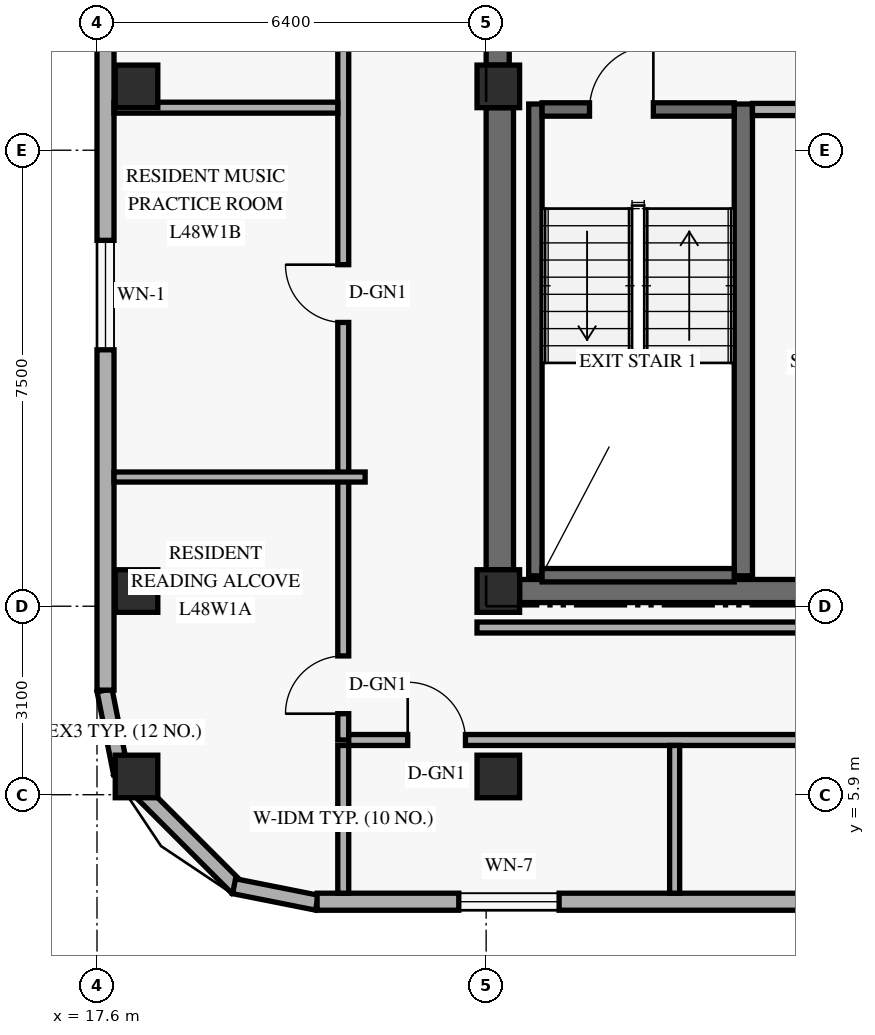
"""IFC4 building model, lengths in metres.
Left out: names, types, materials, properties, quantities, classifications, styles, units other than length and angle.
Written with IfcOpenShell. Run it as: python <this file> out.ifc"""

import sys

from ifc_helpers import new_model, si_unit, direction, frame, frame_2d, origin, origin_2d, place, context, subcontext, project, spatial, rectangle, extrude, element, fill, save


model = new_model("IFC4")
c1 = context("Model", 3, precision=1e-05, world=origin(), true_north=direction((0.0, 1.0)))
c2 = subcontext(c1, "Body", "Model", "MODEL_VIEW")
j1 = project(units=[si_unit("LENGTHUNIT", "METRE"), si_unit("PLANEANGLEUNIT", "RADIAN")], contexts=[c1])
p1 = place(None, origin())
s1 = spatial("IfcSite", under=j1, at=p1, CompositionType="ELEMENT")
p2 = place(p1, origin())
s2 = spatial("IfcBuilding", under=s1, at=p2, CompositionType="ELEMENT")
p3 = place(p2, frame((0.0, 0.0, 184.8)))
s3 = spatial("IfcBuildingStorey", under=s2, at=p3, CompositionType="ELEMENT", Elevation=184.8)
p4 = place(p3, frame((24.225, 9.6, 0.0), z_axis=(0.0, 0.0, 1.0), x_axis=(0.0, 1.0, 0.0)))
e1 = element("IfcWall", 1, at=p4, inside=s3, PredefinedType="SHEAR", context=c2, shape_type="SweptSolid", body=[
    extrude(rectangle(XDim=7.6, YDim=0.45, at=frame_2d((3.8, 0.0))), origin(), (0.0, 0.0, 1.0), 2.748),
])
p5 = place(p3, frame((24.19, 17.9, 0.0), z_axis=(0.0, 0.0, 1.0), x_axis=(0.0, 1.0, 0.0)))
e2 = element("IfcWall", 2, at=p5, inside=s3, PredefinedType="SHEAR", context=c2, shape_type="SweptSolid", body=[
    extrude(rectangle(XDim=11.95, YDim=0.38, at=frame_2d((5.975, 0.0))), origin(), (0.0, 0.0, 1.0), 2.748),
])
p6 = place(p3, frame((24.55, 9.25, 0.0), z_axis=(0.0, 0.0, 1.0), x_axis=(1.0, 0.0, 0.0)))
e3 = element("IfcWall", 3, at=p6, inside=s3, PredefinedType="SHEAR", context=c2, shape_type="SweptSolid", body=[
    extrude(rectangle(XDim=10.3, YDim=0.38, at=frame_2d((5.15, 0.0))), origin(), (0.0, 0.0, 1.0), 3.36),
])
p7 = place(p6, frame((5.2, 0.0, 0.0)))
e4 = element("IfcOpeningElement", 4, at=p7, cuts=e3, PredefinedType="OPENING", context=c2, shape_type="SweptSolid", body=[
    extrude(rectangle(XDim=1.05, YDim=2.15, at=frame_2d((0.525, 1.075))), frame((0.0, 0.2, 0.0), z_axis=(0.0, -1.0, 0.0), x_axis=(1.0, 0.0, 0.0)), (0.0, 0.0, 1.0), 0.4),
])
p8 = place(p3, frame((24.81, 9.5, 0.0), z_axis=(0.0, 0.0, 1.0), x_axis=(0.0, 1.0, 0.0)))
e5 = element("IfcWall", 5, at=p8, inside=s3, PredefinedType="SHEAR", context=c2, shape_type="SweptSolid", body=[
    extrude(rectangle(XDim=7.76, YDim=0.22, at=frame_2d((3.88, 0.0))), origin(), (0.0, 0.0, 1.0), 3.36),
])
p9 = place(p3, frame((28.23, 9.5, 0.0), z_axis=(0.0, 0.0, 1.0), x_axis=(0.0, 1.0, 0.0)))
e6 = element("IfcWall", 6, at=p9, inside=s3, PredefinedType="SHEAR", context=c2, shape_type="SweptSolid", body=[
    extrude(rectangle(XDim=7.76, YDim=0.3, at=frame_2d((3.88, 0.0))), origin(), (0.0, 0.0, 1.0), 3.36),
])
p10 = place(p3, frame((24.92, 9.51, 0.0), z_axis=(0.0, 0.0, 1.0), x_axis=(1.0, 0.0, 0.0)))
e7 = element("IfcWall", 7, at=p10, inside=s3, PredefinedType="SHEAR", context=c2, shape_type="SweptSolid", body=[
    extrude(rectangle(XDim=3.16, YDim=0.22, at=frame_2d((1.58, 0.0))), origin(), (0.0, 0.0, 1.0), 3.36),
])
p11 = place(p3, frame((24.92, 17.17, 0.0), z_axis=(0.0, 0.0, 1.0), x_axis=(1.0, 0.0, 0.0)))
e8 = element("IfcWall", 8, at=p11, inside=s3, PredefinedType="SHEAR", context=c2, shape_type="SweptSolid", body=[
    extrude(rectangle(XDim=3.16, YDim=0.22, at=frame_2d((1.58, 0.0))), origin(), (0.0, 0.0, 1.0), 3.36),
])
p12 = place(p11, frame((0.78, 0.0, 0.0)))
e9 = element("IfcOpeningElement", 9, at=p12, cuts=e8, PredefinedType="OPENING", context=c2, shape_type="SweptSolid", body=[
    extrude(rectangle(XDim=1.05, YDim=2.15, at=frame_2d((0.525, 1.075))), frame((0.0, 0.12, 0.0), z_axis=(0.0, -1.0, 0.0), x_axis=(1.0, 0.0, 0.0)), (0.0, 0.0, 1.0), 0.24),
])
for number, where, z_axis, x_axis in (
    (10, (18.25, 6.2, 0.0), (0.0, 0.0, 1.0), (1.0, 0.0, 0.0)),
    (11, (18.25, 9.25, 0.0), (0.0, 0.0, 1.0), (1.0, 0.0, 0.0)),
    (12, (18.25, 17.55, 0.0), (0.0, 0.0, 1.0), (1.0, 0.0, 0.0)),
    (13, (24.2, 6.2, 0.0), (0.0, 0.0, 1.0), (1.0, 0.0, 0.0)),
    (14, (24.2, 9.25, 0.0), (0.0, 0.0, 1.0), (1.0, 0.0, 0.0)),
    (15, (24.2, 17.55, 0.0), (0.0, 0.0, 1.0), (1.0, 0.0, 0.0)),
):
    element("IfcColumn", number, at=place(p3, frame(where, z_axis=z_axis, x_axis=x_axis)), inside=s3, PredefinedType="COLUMN", context=c2, shape_type="SweptSolid", body=[
        extrude(rectangle(XDim=0.7, YDim=0.7, at=origin_2d()), origin(), (0.0, 0.0, 1.0), 3.6),
    ])
p13 = place(p3, frame((17.724, 7.616, 0.0), z_axis=(0.0, 0.0, 1.0), x_axis=(0.195135625965, -0.9807762678, 0.0)))
e16 = element("IfcWall", 16, at=p13, inside=s3, PredefinedType="SOLIDWALL", context=c2, shape_type="SweptSolid", body=[
    extrude(rectangle(XDim=1.389, YDim=0.25, at=frame_2d((0.694, 0.0))), origin(), (0.0, 0.0, 1.0), 3.36),
])
p14 = place(p3, frame((17.968, 6.305, 0.0), z_axis=(0.0, 0.0, 1.0), x_axis=(0.707106781187, -0.707106781187, 0.0)))
e17 = element("IfcWall", 17, at=p14, inside=s3, PredefinedType="SOLIDWALL", context=c2, shape_type="SweptSolid", body=[
    extrude(rectangle(XDim=2.739, YDim=0.25, at=frame_2d((1.37, 0.0))), origin(), (0.0, 0.0, 1.0), 3.36),
])
p15 = place(p3, frame((19.854, 4.395, 0.0), z_axis=(0.0, 0.0, 1.0), x_axis=(0.980809899341, -0.19496651342, 0.0)))
e18 = element("IfcWall", 18, at=p15, inside=s3, PredefinedType="SOLIDWALL", context=c2, shape_type="SweptSolid", body=[
    extrude(rectangle(XDim=1.389, YDim=0.25, at=frame_2d((0.694, 0.0))), origin(), (0.0, 0.0, 1.0), 3.36),
])
p16 = place(p3, frame((21.22, 4.14, 0.0), z_axis=(0.0, 0.0, 1.0), x_axis=(1.0, 0.0, 0.0)))
e19 = element("IfcWall", 19, at=p16, inside=s3, PredefinedType="SOLIDWALL", context=c2, shape_type="SweptSolid", body=[
    extrude(rectangle(XDim=33.76, YDim=0.28, at=frame_2d((16.88, 0.0))), origin(), (0.0, 0.0, 1.0), 3.36),
])
p17 = place(p16, frame((2.33, 0.0, 0.85)))
e20 = element("IfcOpeningElement", 20, at=p17, cuts=e19, PredefinedType="OPENING", context=c2, shape_type="SweptSolid", body=[
    extrude(rectangle(XDim=1.65, YDim=1.6, at=frame_2d((0.825, 0.8))), frame((0.0, 0.15, 0.0), z_axis=(0.0, -1.0, 0.0), x_axis=(1.0, 0.0, 0.0)), (0.0, 0.0, 1.0), 0.3),
])
p18 = place(p16, frame((9.215, 0.0, 0.85)))
e21 = element("IfcOpeningElement", 21, at=p18, cuts=e19, PredefinedType="OPENING", context=c2, shape_type="SweptSolid", body=[
    extrude(rectangle(XDim=1.65, YDim=1.6, at=frame_2d((0.825, 0.8))), frame((0.0, 0.15, 0.0), z_axis=(0.0, -1.0, 0.0), x_axis=(1.0, 0.0, 0.0)), (0.0, 0.0, 1.0), 0.3),
])
p19 = place(p16, frame((14.64, 0.0, 0.85)))
e22 = element("IfcOpeningElement", 22, at=p19, cuts=e19, PredefinedType="OPENING", context=c2, shape_type="SweptSolid", body=[
    extrude(rectangle(XDim=1.65, YDim=1.6, at=frame_2d((0.825, 0.8))), frame((0.0, 0.15, 0.0), z_axis=(0.0, -1.0, 0.0), x_axis=(1.0, 0.0, 0.0)), (0.0, 0.0, 1.0), 0.3),
])
p20 = place(p16, frame((20.489, 0.0, 0.85)))
e23 = element("IfcOpeningElement", 23, at=p20, cuts=e19, PredefinedType="OPENING", context=c2, shape_type="SweptSolid", body=[
    extrude(rectangle(XDim=1.65, YDim=1.6, at=frame_2d((0.825, 0.8))), frame((0.0, 0.15, 0.0), z_axis=(0.0, -1.0, 0.0), x_axis=(1.0, 0.0, 0.0)), (0.0, 0.0, 1.0), 0.3),
])
p21 = place(p16, frame((26.197, 0.0, 0.85)))
e24 = element("IfcOpeningElement", 24, at=p21, cuts=e19, PredefinedType="OPENING", context=c2, shape_type="SweptSolid", body=[
    extrude(rectangle(XDim=1.2, YDim=1.5, at=frame_2d((0.6, 0.75))), frame((0.0, 0.15, 0.0), z_axis=(0.0, -1.0, 0.0), x_axis=(1.0, 0.0, 0.0)), (0.0, 0.0, 1.0), 0.3),
])
p22 = place(p16, frame((29.904, 0.0, 0.85)))
e25 = element("IfcOpeningElement", 25, at=p22, cuts=e19, PredefinedType="OPENING", context=c2, shape_type="SweptSolid", body=[
    extrude(rectangle(XDim=1.65, YDim=1.6, at=frame_2d((0.825, 0.8))), frame((0.0, 0.15, 0.0), z_axis=(0.0, -1.0, 0.0), x_axis=(1.0, 0.0, 0.0)), (0.0, 0.0, 1.0), 0.3),
])
p23 = place(p3, frame((17.74, 40.38, 0.0), z_axis=(0.0, 0.0, 1.0), x_axis=(0.0, -1.0, 0.0)))
e26 = element("IfcWall", 26, at=p23, inside=s3, PredefinedType="SOLIDWALL", context=c2, shape_type="SweptSolid", body=[
    extrude(rectangle(XDim=32.76, YDim=0.28, at=frame_2d((16.38, 0.0))), origin(), (0.0, 0.0, 1.0), 3.36),
])
p24 = place(p23, frame((25.363, 0.0, 0.85)))
e27 = element("IfcOpeningElement", 27, at=p24, cuts=e26, PredefinedType="OPENING", context=c2, shape_type="SweptSolid", body=[
    extrude(rectangle(XDim=1.8, YDim=1.6, at=frame_2d((0.9, 0.8))), frame((0.0, 0.15, 0.0), z_axis=(0.0, -1.0, 0.0), x_axis=(1.0, 0.0, 0.0)), (0.0, 0.0, 1.0), 0.3),
])
p25 = place(p23, frame((18.71, 0.0, 0.85)))
e28 = element("IfcOpeningElement", 28, at=p25, cuts=e26, PredefinedType="OPENING", context=c2, shape_type="SweptSolid", body=[
    extrude(rectangle(XDim=1.8, YDim=1.6, at=frame_2d((0.9, 0.8))), frame((0.0, 0.15, 0.0), z_axis=(0.0, -1.0, 0.0), x_axis=(1.0, 0.0, 0.0)), (0.0, 0.0, 1.0), 0.3),
])
p26 = place(p23, frame((12.825, 0.0, 0.85)))
e29 = element("IfcOpeningElement", 29, at=p26, cuts=e26, PredefinedType="OPENING", context=c2, shape_type="SweptSolid", body=[
    extrude(rectangle(XDim=1.8, YDim=1.6, at=frame_2d((0.9, 0.8))), frame((0.0, 0.15, 0.0), z_axis=(0.0, -1.0, 0.0), x_axis=(1.0, 0.0, 0.0)), (0.0, 0.0, 1.0), 0.3),
])
p27 = place(p23, frame((5.417, 0.0, 0.85)))
e30 = element("IfcOpeningElement", 30, at=p27, cuts=e26, PredefinedType="OPENING", context=c2, shape_type="SweptSolid", body=[
    extrude(rectangle(XDim=1.8, YDim=1.6, at=frame_2d((0.9, 0.8))), frame((0.0, 0.15, 0.0), z_axis=(0.0, -1.0, 0.0), x_axis=(1.0, 0.0, 0.0)), (0.0, 0.0, 1.0), 0.3),
])
p28 = place(p3, frame((28.38, 17.17, 0.0), z_axis=(0.0, 0.0, 1.0), x_axis=(1.0, 0.0, 0.0)))
e31 = element("IfcWall", 31, at=p28, inside=s3, PredefinedType="STANDARD", context=c2, shape_type="SweptSolid", body=[
    extrude(rectangle(XDim=2.9, YDim=0.2, at=frame_2d((1.45, 0.0))), origin(), (0.0, 0.0, 1.0), 3.36),
])
p29 = place(p3, frame((21.65, 6.8, 0.0), z_axis=(0.0, 0.0, 1.0), x_axis=(0.0, 1.0, 0.0)))
e32 = element("IfcWall", 32, at=p29, inside=s3, PredefinedType="STANDARD", context=c2, shape_type="SweptSolid", body=[
    extrude(rectangle(XDim=34.4, YDim=0.18, at=frame_2d((17.2, 0.0))), origin(), (0.0, 0.0, 1.0), 2.73),
])
p30 = place(p29, frame((0.433, 0.0, 0.0)))
e33 = element("IfcOpeningElement", 33, at=p30, cuts=e32, PredefinedType="OPENING", context=c2, shape_type="SweptSolid", body=[
    extrude(rectangle(XDim=0.95, YDim=2.15, at=frame_2d((0.475, 1.075))), frame((0.0, 0.1, 0.0), z_axis=(0.0, -1.0, 0.0), x_axis=(1.0, 0.0, 0.0)), (0.0, 0.0, 1.0), 0.2),
])
p31 = place(p29, frame((6.867, 0.0, 0.0)))
e34 = element("IfcOpeningElement", 34, at=p31, cuts=e32, PredefinedType="OPENING", context=c2, shape_type="SweptSolid", body=[
    extrude(rectangle(XDim=0.95, YDim=2.15, at=frame_2d((0.475, 1.075))), frame((0.0, 0.1, 0.0), z_axis=(0.0, -1.0, 0.0), x_axis=(1.0, 0.0, 0.0)), (0.0, 0.0, 1.0), 0.2),
])
p32 = place(p29, frame((13.17, 0.0, 0.0)))
e35 = element("IfcOpeningElement", 35, at=p32, cuts=e32, PredefinedType="OPENING", context=c2, shape_type="SweptSolid", body=[
    extrude(rectangle(XDim=0.95, YDim=2.15, at=frame_2d((0.475, 1.075))), frame((0.0, 0.1, 0.0), z_axis=(0.0, -1.0, 0.0), x_axis=(1.0, 0.0, 0.0)), (0.0, 0.0, 1.0), 0.2),
])
p33 = place(p29, frame((19.88, 0.0, 0.0)))
e36 = element("IfcOpeningElement", 36, at=p33, cuts=e32, PredefinedType="OPENING", context=c2, shape_type="SweptSolid", body=[
    extrude(rectangle(XDim=0.95, YDim=2.15, at=frame_2d((0.475, 1.075))), frame((0.0, 0.1, 0.0), z_axis=(0.0, -1.0, 0.0), x_axis=(1.0, 0.0, 0.0)), (0.0, 0.0, 1.0), 0.2),
])
p34 = place(p29, frame((26.857, 0.0, 0.0)))
e37 = element("IfcOpeningElement", 37, at=p34, cuts=e32, PredefinedType="OPENING", context=c2, shape_type="SweptSolid", body=[
    extrude(rectangle(XDim=0.95, YDim=2.15, at=frame_2d((0.475, 1.075))), frame((0.0, 0.1, 0.0), z_axis=(0.0, -1.0, 0.0), x_axis=(1.0, 0.0, 0.0)), (0.0, 0.0, 1.0), 0.2),
])
p35 = place(p29, frame((33.153, 0.0, 0.0)))
e38 = element("IfcOpeningElement", 38, at=p35, cuts=e32, PredefinedType="OPENING", context=c2, shape_type="SweptSolid", body=[
    extrude(rectangle(XDim=0.95, YDim=2.15, at=frame_2d((0.475, 1.075))), frame((0.0, 0.1, 0.0), z_axis=(0.0, -1.0, 0.0), x_axis=(1.0, 0.0, 0.0)), (0.0, 0.0, 1.0), 0.2),
])
p36 = place(p3, frame((21.74, 6.8, 0.0), z_axis=(0.0, 0.0, 1.0), x_axis=(1.0, 0.0, 0.0)))
e39 = element("IfcWall", 39, at=p36, inside=s3, PredefinedType="STANDARD", context=c2, shape_type="SweptSolid", body=[
    extrude(rectangle(XDim=13.68, YDim=0.18, at=frame_2d((6.84, 0.0))), origin(), (0.0, 0.0, 1.0), 2.73),
])
p37 = place(p36, frame((0.97, 0.0, 0.0)))
e40 = element("IfcOpeningElement", 40, at=p37, cuts=e39, PredefinedType="OPENING", context=c2, shape_type="SweptSolid", body=[
    extrude(rectangle(XDim=0.95, YDim=2.15, at=frame_2d((0.475, 1.075))), frame((0.0, 0.1, 0.0), z_axis=(0.0, -1.0, 0.0), x_axis=(1.0, 0.0, 0.0)), (0.0, 0.0, 1.0), 0.2),
])
p38 = place(p36, frame((9.11, 0.0, 0.0)))
e41 = element("IfcOpeningElement", 41, at=p38, cuts=e39, PredefinedType="OPENING", context=c2, shape_type="SweptSolid", body=[
    extrude(rectangle(XDim=0.95, YDim=2.15, at=frame_2d((0.475, 1.075))), frame((0.0, 0.1, 0.0), z_axis=(0.0, -1.0, 0.0), x_axis=(1.0, 0.0, 0.0)), (0.0, 0.0, 1.0), 0.2),
])
p39 = place(p3, frame((23.85, 8.65, 0.0), z_axis=(0.0, 0.0, 1.0), x_axis=(1.0, 0.0, 0.0)))
e42 = element("IfcWall", 42, at=p39, inside=s3, PredefinedType="STANDARD", context=c2, shape_type="SweptSolid", body=[
    extrude(rectangle(XDim=11.57, YDim=0.18, at=frame_2d((5.785, 0.0))), origin(), (0.0, 0.0, 1.0), 2.73),
])
p40 = place(p3, frame((21.65, 4.28, 0.0), z_axis=(0.0, 0.0, 1.0), x_axis=(0.0, 1.0, 0.0)))
e43 = element("IfcWall", 43, at=p40, inside=s3, PredefinedType="PARTITIONING", context=c2, shape_type="SweptSolid", body=[
    extrude(rectangle(XDim=2.43, YDim=0.18, at=frame_2d((1.215, 0.0))), origin(), (0.0, 0.0, 1.0), 2.879),
])
p41 = place(p3, frame((17.88, 11.125, 0.0), z_axis=(0.0, 0.0, 1.0), x_axis=(1.0, 0.0, 0.0)))
e44 = element("IfcWall", 44, at=p41, inside=s3, PredefinedType="PARTITIONING", context=c2, shape_type="SweptSolid", body=[
    extrude(rectangle(XDim=4.13, YDim=0.165, at=frame_2d((2.065, 0.0))), origin(), (0.0, 0.0, 1.0), 2.879),
])
p42 = place(p3, frame((17.88, 17.2, 0.0), z_axis=(0.0, 0.0, 1.0), x_axis=(1.0, 0.0, 0.0)))
e45 = element("IfcWall", 45, at=p42, inside=s3, PredefinedType="PARTITIONING", context=c2, shape_type="SweptSolid", body=[
    extrude(rectangle(XDim=3.68, YDim=0.18, at=frame_2d((1.84, 0.0))), origin(), (0.0, 0.0, 1.0), 2.879),
])
p43 = place(p3, frame((27.1, 4.28, 0.0), z_axis=(0.0, 0.0, 1.0), x_axis=(0.0, 1.0, 0.0)))
e46 = element("IfcWall", 46, at=p43, inside=s3, PredefinedType="PARTITIONING", context=c2, shape_type="SweptSolid", body=[
    extrude(rectangle(XDim=2.43, YDim=0.165, at=frame_2d((1.215, 0.0))), origin(), (0.0, 0.0, 1.0), 2.879),
])
p44 = place(p17, origin())
e47 = element("IfcWindow", 47, at=p44, inside=s3, PartitioningType="SINGLE_PANEL", PredefinedType="WINDOW", context=c2, shape_type="SweptSolid", body=[
    extrude(rectangle(XDim=1.65, YDim=1.6, at=frame_2d((0.825, 0.8))), frame((0.0, 0.03, 0.0), z_axis=(0.0, -1.0, 0.0), x_axis=(1.0, 0.0, 0.0)), (0.0, 0.0, 1.0), 0.06),
])
fill(e20, e47)
p45 = place(p24, origin())
e48 = element("IfcWindow", 48, at=p45, inside=s3, PartitioningType="SINGLE_PANEL", PredefinedType="WINDOW", context=c2, shape_type="SweptSolid", body=[
    extrude(rectangle(XDim=1.8, YDim=1.6, at=frame_2d((0.9, 0.8))), frame((0.0, 0.03, 0.0), z_axis=(0.0, -1.0, 0.0), x_axis=(1.0, 0.0, 0.0)), (0.0, 0.0, 1.0), 0.06),
])
fill(e27, e48)
p46 = place(p12, frame((1.05, 0.0, 0.0), z_axis=(0.0, 0.0, 1.0), x_axis=(-1.0, 0.0, 0.0)))
e49 = element("IfcDoor", 49, at=p46, inside=s3, OperationType="SINGLE_SWING_LEFT", PredefinedType="DOOR", context=c2, shape_type="SweptSolid", body=[
    extrude(rectangle(XDim=1.05, YDim=2.15, at=frame_2d((0.525, 1.075))), frame((0.0, 0.025, 0.0), z_axis=(0.0, -1.0, 0.0), x_axis=(1.0, 0.0, 0.0)), (0.0, 0.0, 1.0), 0.05),
])
fill(e9, e49)
p47 = place(p30, origin())
e50 = element("IfcDoor", 50, at=p47, inside=s3, OperationType="SINGLE_SWING_LEFT", PredefinedType="DOOR", context=c2, shape_type="SweptSolid", body=[
    extrude(rectangle(XDim=0.95, YDim=2.15, at=frame_2d((0.475, 1.075))), frame((0.0, 0.025, 0.0), z_axis=(0.0, -1.0, 0.0), x_axis=(1.0, 0.0, 0.0)), (0.0, 0.0, 1.0), 0.05),
])
fill(e33, e50)
p48 = place(p31, origin())
e51 = element("IfcDoor", 51, at=p48, inside=s3, OperationType="SINGLE_SWING_RIGHT", PredefinedType="DOOR", context=c2, shape_type="SweptSolid", body=[
    extrude(rectangle(XDim=0.95, YDim=2.15, at=frame_2d((0.475, 1.075))), frame((0.0, 0.025, 0.0), z_axis=(0.0, -1.0, 0.0), x_axis=(1.0, 0.0, 0.0)), (0.0, 0.0, 1.0), 0.05),
])
fill(e34, e51)
p49 = place(p37, origin())
e52 = element("IfcDoor", 52, at=p49, inside=s3, OperationType="SINGLE_SWING_LEFT", PredefinedType="DOOR", context=c2, shape_type="SweptSolid", body=[
    extrude(rectangle(XDim=0.95, YDim=2.15, at=frame_2d((0.475, 1.075))), frame((0.0, 0.025, 0.0), z_axis=(0.0, -1.0, 0.0), x_axis=(1.0, 0.0, 0.0)), (0.0, 0.0, 1.0), 0.05),
])
fill(e40, e52)
save(model, sys.argv[1])
